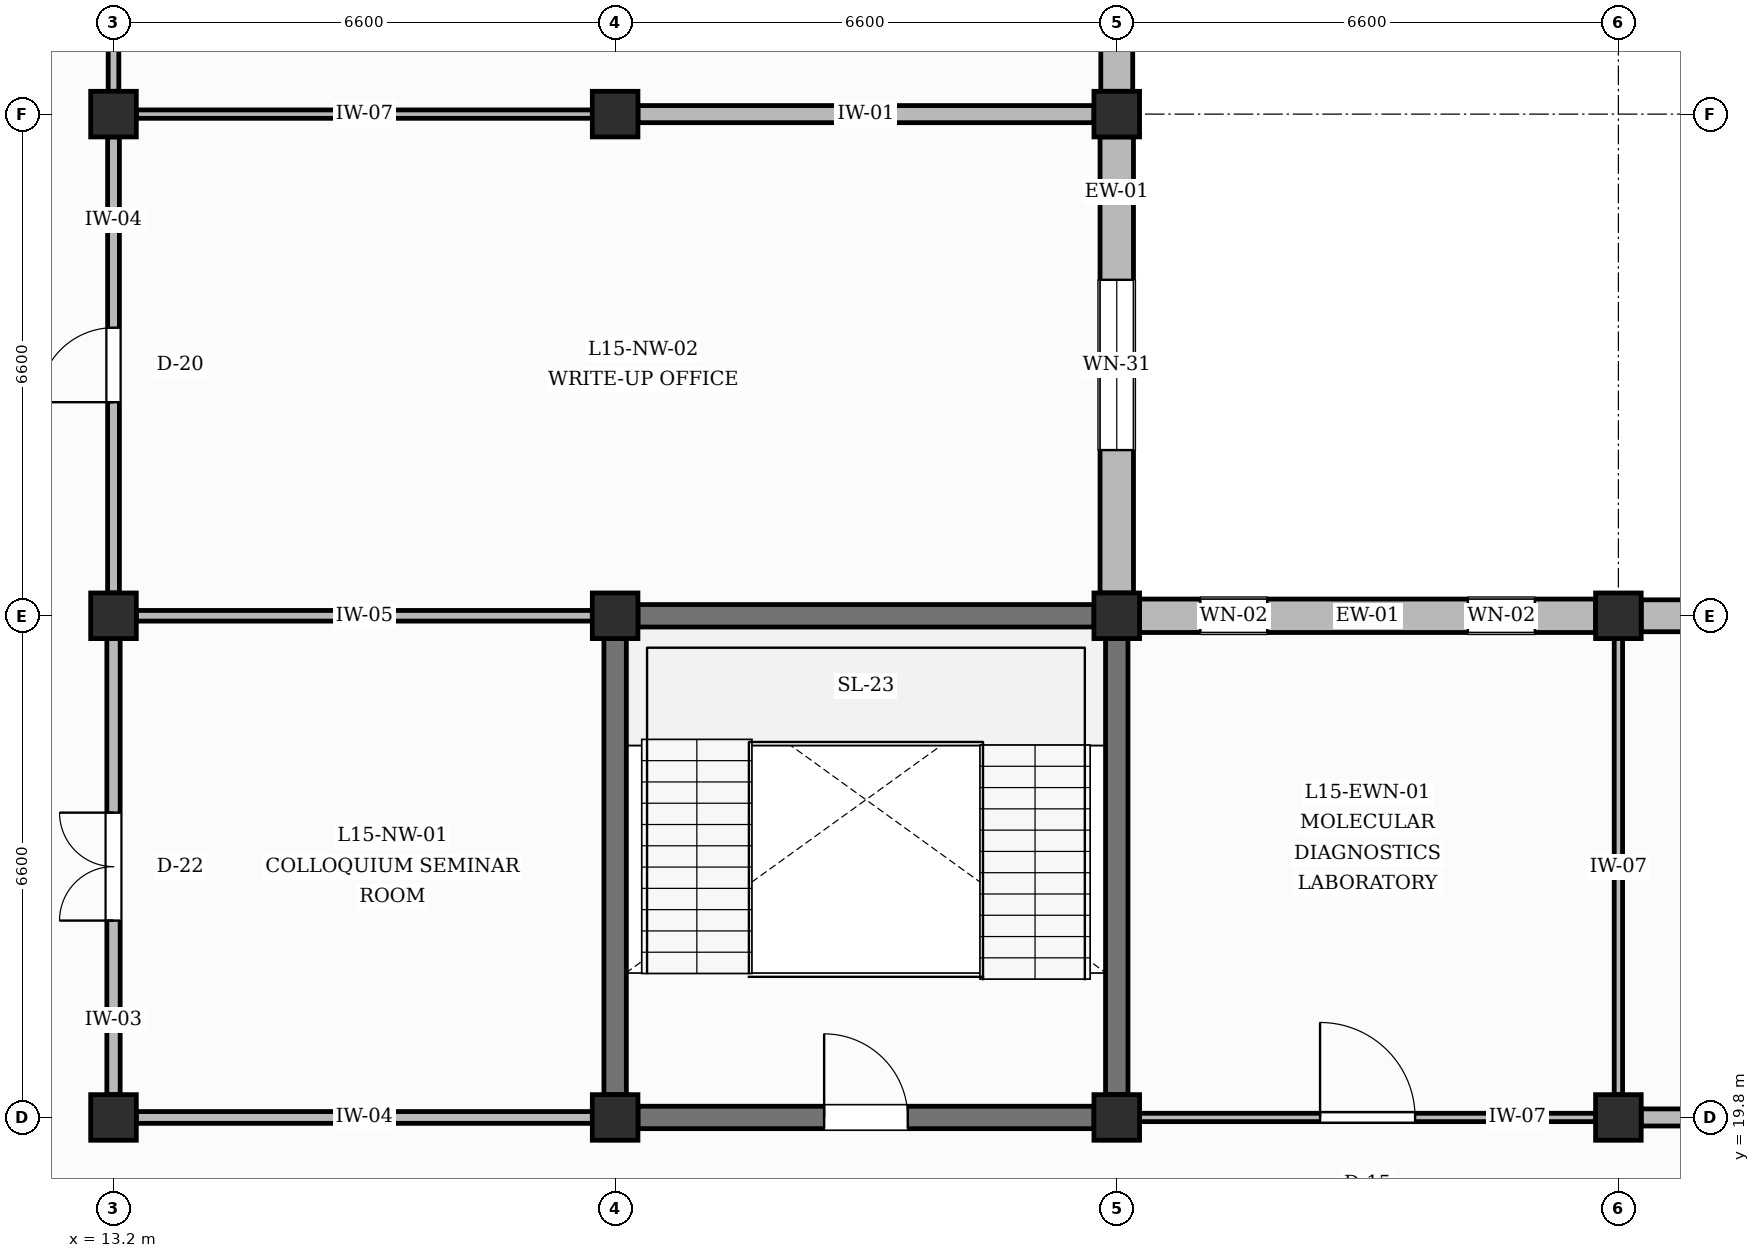
"""IFC4 building model, lengths in metres.
Left out: names, types, materials, properties, quantities, classifications, styles, units other than length and angle.
Written with IfcOpenShell. Run it as: python <this file> out.ifc"""

import sys

from ifc_helpers import new_model, si_unit, direction, frame, frame_2d, origin, origin_2d, place, context, subcontext, project, spatial, rectangle, extrude, element, fill, save


model = new_model("IFC4")
c1 = context("Model", 3, precision=1e-05, world=origin(), true_north=direction((0.0, 1.0)))
c2 = subcontext(c1, "Body", "Model", "MODEL_VIEW")
j1 = project(units=[si_unit("LENGTHUNIT", "METRE"), si_unit("PLANEANGLEUNIT", "RADIAN")], contexts=[c1])
p1 = place(None, origin())
s1 = spatial("IfcSite", under=j1, at=p1, CompositionType="ELEMENT")
p2 = place(p1, origin())
s2 = spatial("IfcBuilding", under=s1, at=p2, CompositionType="ELEMENT")
p3 = place(p2, frame((0.0, 0.0, 64.8)))
s3 = spatial("IfcBuildingStorey", under=s2, at=p3, CompositionType="ELEMENT", Elevation=64.8)
for number, where, z_axis, x_axis in (
    (1, (13.2, 19.8, 0.0), (0.0, 0.0, 1.0), (1.0, 0.0, 0.0)),
    (2, (13.2, 26.4, 0.0), (0.0, 0.0, 1.0), (1.0, 0.0, 0.0)),
    (3, (13.2, 33.0, 0.0), (0.0, 0.0, 1.0), (1.0, 0.0, 0.0)),
    (4, (19.8, 19.8, 0.0), (0.0, 0.0, 1.0), (1.0, 0.0, 0.0)),
    (5, (19.8, 26.4, 0.0), (0.0, 0.0, 1.0), (1.0, 0.0, 0.0)),
    (6, (19.8, 33.0, 0.0), (0.0, 0.0, 1.0), (1.0, 0.0, 0.0)),
    (7, (26.4, 19.8, 0.0), (0.0, 0.0, 1.0), (1.0, 0.0, 0.0)),
    (8, (26.4, 26.4, 0.0), (0.0, 0.0, 1.0), (1.0, 0.0, 0.0)),
    (9, (26.4, 33.0, 0.0), (0.0, 0.0, 1.0), (1.0, 0.0, 0.0)),
    (10, (33.0, 19.8, 0.0), (0.0, 0.0, 1.0), (1.0, 0.0, 0.0)),
    (11, (33.0, 26.4, 0.0), (0.0, 0.0, 1.0), (1.0, 0.0, 0.0)),
):
    element("IfcColumn", number, at=place(p3, frame(where, z_axis=z_axis, x_axis=x_axis)), inside=s3, PredefinedType="COLUMN", context=c2, shape_type="SweptSolid", body=[
        extrude(rectangle(XDim=0.6, YDim=0.6, at=origin_2d()), origin(), (0.0, 0.0, 1.0), 4.2),
    ])
p4 = place(p3, frame((26.4, 26.7, 0.0), z_axis=(0.0, 0.0, 1.0), x_axis=(0.0, 1.0, 0.0)))
e12 = element("IfcWall", 12, at=p4, inside=s3, PredefinedType="SOLIDWALL", context=c2, shape_type="SweptSolid", body=[
    extrude(rectangle(XDim=6.0, YDim=0.44, at=frame_2d((3.0, 0.0))), origin(), (0.0, 0.0, 1.0), 3.3),
])
p5 = place(p4, frame((1.88, 0.0, 0.95)))
e13 = element("IfcOpeningElement", 13, at=p5, cuts=e12, PredefinedType="OPENING", context=c2, shape_type="SweptSolid", body=[
    extrude(rectangle(XDim=2.24, YDim=1.74, at=frame_2d((1.12, 0.87))), frame((0.0, 0.23, 0.0), z_axis=(0.0, -1.0, 0.0), x_axis=(1.0, 0.0, 0.0)), (0.0, 0.0, 1.0), 0.46),
])
p6 = place(p3, frame((26.4, 33.3, 0.0), z_axis=(0.0, 0.0, 1.0), x_axis=(0.0, 1.0, 0.0)))
e14 = element("IfcWall", 14, at=p6, inside=s3, PredefinedType="SOLIDWALL", context=c2, shape_type="SweptSolid", body=[
    extrude(rectangle(XDim=6.0, YDim=0.42, at=frame_2d((3.0, 0.0))), origin(), (0.0, 0.0, 1.0), 3.3),
])
p7 = place(p6, frame((1.88, 0.0, 0.95)))
e15 = element("IfcOpeningElement", 15, at=p7, cuts=e14, PredefinedType="OPENING", context=c2, shape_type="SweptSolid", body=[
    extrude(rectangle(XDim=2.24, YDim=1.96, at=frame_2d((1.12, 0.98))), frame((0.0, 0.22, 0.0), z_axis=(0.0, -1.0, 0.0), x_axis=(1.0, 0.0, 0.0)), (0.0, 0.0, 1.0), 0.44),
])
p8 = place(p3, frame((26.7, 26.4, 0.0), z_axis=(0.0, 0.0, 1.0), x_axis=(1.0, 0.0, 0.0)))
e16 = element("IfcWall", 16, at=p8, inside=s3, PredefinedType="SOLIDWALL", context=c2, shape_type="SweptSolid", body=[
    extrude(rectangle(XDim=6.0, YDim=0.44, at=frame_2d((3.0, 0.0))), origin(), (0.0, 0.0, 1.0), 3.3),
])
p9 = place(p8, frame((0.8, 0.0, 0.95)))
e17 = element("IfcOpeningElement", 17, at=p9, cuts=e16, PredefinedType="OPENING", context=c2, shape_type="SweptSolid", body=[
    extrude(rectangle(XDim=0.88, YDim=1.52, at=frame_2d((0.44, 0.76))), frame((0.0, 0.23, 0.0), z_axis=(0.0, -1.0, 0.0), x_axis=(1.0, 0.0, 0.0)), (0.0, 0.0, 1.0), 0.46),
])
p10 = place(p8, frame((4.32, 0.0, 0.95)))
e18 = element("IfcOpeningElement", 18, at=p10, cuts=e16, PredefinedType="OPENING", context=c2, shape_type="SweptSolid", body=[
    extrude(rectangle(XDim=0.88, YDim=1.52, at=frame_2d((0.44, 0.76))), frame((0.0, 0.23, 0.0), z_axis=(0.0, -1.0, 0.0), x_axis=(1.0, 0.0, 0.0)), (0.0, 0.0, 1.0), 0.46),
])
p11 = place(p3, frame((33.3, 26.4, 0.0), z_axis=(0.0, 0.0, 1.0), x_axis=(1.0, 0.0, 0.0)))
e19 = element("IfcWall", 19, at=p11, inside=s3, PredefinedType="SOLIDWALL", context=c2, shape_type="SweptSolid", body=[
    extrude(rectangle(XDim=6.0, YDim=0.42, at=frame_2d((3.0, 0.0))), origin(), (0.0, 0.0, 1.0), 3.3),
])
p12 = place(p11, frame((0.8, 0.0, 0.95)))
e20 = element("IfcOpeningElement", 20, at=p12, cuts=e19, PredefinedType="OPENING", context=c2, shape_type="SweptSolid", body=[
    extrude(rectangle(XDim=1.02, YDim=1.3, at=frame_2d((0.51, 0.65))), frame((0.0, 0.22, 0.0), z_axis=(0.0, -1.0, 0.0), x_axis=(1.0, 0.0, 0.0)), (0.0, 0.0, 1.0), 0.44),
])
p13 = place(p11, frame((4.18, 0.0, 0.95)))
e21 = element("IfcOpeningElement", 21, at=p13, cuts=e19, PredefinedType="OPENING", context=c2, shape_type="SweptSolid", body=[
    extrude(rectangle(XDim=1.02, YDim=1.3, at=frame_2d((0.51, 0.65))), frame((0.0, 0.22, 0.0), z_axis=(0.0, -1.0, 0.0), x_axis=(1.0, 0.0, 0.0)), (0.0, 0.0, 1.0), 0.44),
])
p14 = place(p3, frame((20.1, 19.8, 0.0), z_axis=(0.0, 0.0, 1.0), x_axis=(1.0, 0.0, 0.0)))
e22 = element("IfcWall", 22, at=p14, inside=s3, PredefinedType="SHEAR", context=c2, shape_type="SweptSolid", body=[
    extrude(rectangle(XDim=6.0, YDim=0.295, at=frame_2d((3.0, 0.0))), origin(), (0.0, 0.0, 1.0), 3.3),
])
p15 = place(p14, frame((2.45, 0.0, 0.0)))
e23 = element("IfcOpeningElement", 23, at=p15, cuts=e22, PredefinedType="OPENING", context=c2, shape_type="SweptSolid", body=[
    extrude(rectangle(XDim=1.1, YDim=2.15, at=frame_2d((0.55, 1.075))), frame((0.0, 0.157, 0.0), z_axis=(0.0, -1.0, 0.0), x_axis=(1.0, 0.0, 0.0)), (0.0, 0.0, 1.0), 0.315),
])
for number, where, z_axis, x_axis in (
    (24, (20.1, 26.4, 0.0), (0.0, 0.0, 1.0), (1.0, 0.0, 0.0)),
    (25, (19.8, 20.1, 0.0), (0.0, 0.0, 1.0), (0.0, 1.0, 0.0)),
    (26, (26.4, 20.1, 0.0), (0.0, 0.0, 1.0), (0.0, 1.0, 0.0)),
):
    element("IfcWall", number, at=place(p3, frame(where, z_axis=z_axis, x_axis=x_axis)), inside=s3, PredefinedType="SHEAR", context=c2, shape_type="SweptSolid", body=[
        extrude(rectangle(XDim=6.0, YDim=0.295, at=frame_2d((3.0, 0.0))), origin(), (0.0, 0.0, 1.0), 3.3),
    ])
p16 = place(p3, frame((13.2, 20.1, 0.0), z_axis=(0.0, 0.0, 1.0), x_axis=(0.0, 1.0, 0.0)))
e27 = element("IfcWall", 27, at=p16, inside=s3, PredefinedType="PARTITIONING", context=c2, shape_type="SweptSolid", body=[
    extrude(rectangle(XDim=6.0, YDim=0.175, at=frame_2d((3.0, 0.0))), origin(), (0.0, 0.0, 1.0), 3.3),
])
p17 = place(p16, frame((2.29, 0.0, 0.0)))
e28 = element("IfcOpeningElement", 28, at=p17, cuts=e27, PredefinedType="OPENING", context=c2, shape_type="SweptSolid", body=[
    extrude(rectangle(XDim=1.42, YDim=2.2, at=frame_2d((0.71, 1.1))), frame((0.0, 0.097, 0.0), z_axis=(0.0, -1.0, 0.0), x_axis=(1.0, 0.0, 0.0)), (0.0, 0.0, 1.0), 0.195),
])
p18 = place(p3, frame((13.2, 26.7, 0.0), z_axis=(0.0, 0.0, 1.0), x_axis=(0.0, 1.0, 0.0)))
e29 = element("IfcWall", 29, at=p18, inside=s3, PredefinedType="PARTITIONING", context=c2, shape_type="SweptSolid", body=[
    extrude(rectangle(XDim=6.0, YDim=0.155, at=frame_2d((3.0, 0.0))), origin(), (0.0, 0.0, 1.0), 3.3),
])
p19 = place(p18, frame((2.51, 0.0, 0.0)))
e30 = element("IfcOpeningElement", 30, at=p19, cuts=e29, PredefinedType="OPENING", context=c2, shape_type="SweptSolid", body=[
    extrude(rectangle(XDim=0.98, YDim=2.15, at=frame_2d((0.49, 1.075))), frame((0.0, 0.087, 0.0), z_axis=(0.0, -1.0, 0.0), x_axis=(1.0, 0.0, 0.0)), (0.0, 0.0, 1.0), 0.175),
])
p20 = place(p3, frame((13.2, 33.3, 0.0), z_axis=(0.0, 0.0, 1.0), x_axis=(0.0, 1.0, 0.0)))
e31 = element("IfcWall", 31, at=p20, inside=s3, PredefinedType="PARTITIONING", context=c2, shape_type="SweptSolid", body=[
    extrude(rectangle(XDim=6.0, YDim=0.14, at=frame_2d((3.0, 0.0))), origin(), (0.0, 0.0, 1.0), 3.3),
])
p21 = place(p20, frame((2.275, 0.0, 0.0)))
e32 = element("IfcOpeningElement", 32, at=p21, cuts=e31, PredefinedType="OPENING", context=c2, shape_type="SweptSolid", body=[
    extrude(rectangle(XDim=1.45, YDim=2.25, at=frame_2d((0.725, 1.125))), frame((0.0, 0.08, 0.0), z_axis=(0.0, -1.0, 0.0), x_axis=(1.0, 0.0, 0.0)), (0.0, 0.0, 1.0), 0.16),
])
p22 = place(p3, frame((13.5, 19.8, 0.0), z_axis=(0.0, 0.0, 1.0), x_axis=(1.0, 0.0, 0.0)))
e33 = element("IfcWall", 33, at=p22, inside=s3, PredefinedType="PARTITIONING", context=c2, shape_type="SweptSolid", body=[
    extrude(rectangle(XDim=6.0, YDim=0.155, at=frame_2d((3.0, 0.0))), origin(), (0.0, 0.0, 1.0), 3.3),
])
p23 = place(p3, frame((13.5, 26.4, 0.0), z_axis=(0.0, 0.0, 1.0), x_axis=(1.0, 0.0, 0.0)))
e34 = element("IfcWall", 34, at=p23, inside=s3, PredefinedType="PARTITIONING", context=c2, shape_type="SweptSolid", body=[
    extrude(rectangle(XDim=6.0, YDim=0.14, at=frame_2d((3.0, 0.0))), origin(), (0.0, 0.0, 1.0), 3.3),
])
p24 = place(p3, frame((13.5, 33.0, 0.0), z_axis=(0.0, 0.0, 1.0), x_axis=(1.0, 0.0, 0.0)))
e35 = element("IfcWall", 35, at=p24, inside=s3, PredefinedType="PARTITIONING", context=c2, shape_type="SweptSolid", body=[
    extrude(rectangle(XDim=6.0, YDim=0.11, at=frame_2d((3.0, 0.0))), origin(), (0.0, 0.0, 1.0), 3.3),
])
p25 = place(p3, frame((20.1, 33.0, 0.0), z_axis=(0.0, 0.0, 1.0), x_axis=(1.0, 0.0, 0.0)))
e36 = element("IfcWall", 36, at=p25, inside=s3, PredefinedType="PARTITIONING", context=c2, shape_type="SweptSolid", body=[
    extrude(rectangle(XDim=6.0, YDim=0.225, at=frame_2d((3.0, 0.0))), origin(), (0.0, 0.0, 1.0), 3.3),
])
p26 = place(p3, frame((26.7, 19.8, 0.0), z_axis=(0.0, 0.0, 1.0), x_axis=(1.0, 0.0, 0.0)))
e37 = element("IfcWall", 37, at=p26, inside=s3, PredefinedType="PARTITIONING", context=c2, shape_type="SweptSolid", body=[
    extrude(rectangle(XDim=6.0, YDim=0.11, at=frame_2d((3.0, 0.0))), origin(), (0.0, 0.0, 1.0), 3.3),
])
p27 = place(p26, frame((2.375, 0.0, 0.0)))
e38 = element("IfcOpeningElement", 38, at=p27, cuts=e37, PredefinedType="OPENING", context=c2, shape_type="SweptSolid", body=[
    extrude(rectangle(XDim=1.25, YDim=2.25, at=frame_2d((0.625, 1.125))), frame((0.0, 0.065, 0.0), z_axis=(0.0, -1.0, 0.0), x_axis=(1.0, 0.0, 0.0)), (0.0, 0.0, 1.0), 0.13),
])
p28 = place(p3, frame((33.0, 20.1, 0.0), z_axis=(0.0, 0.0, 1.0), x_axis=(0.0, 1.0, 0.0)))
e39 = element("IfcWall", 39, at=p28, inside=s3, PredefinedType="PARTITIONING", context=c2, shape_type="SweptSolid", body=[
    extrude(rectangle(XDim=6.0, YDim=0.11, at=frame_2d((3.0, 0.0))), origin(), (0.0, 0.0, 1.0), 3.3),
])
p29 = place(p3, frame((33.3, 19.8, 0.0), z_axis=(0.0, 0.0, 1.0), x_axis=(1.0, 0.0, 0.0)))
e40 = element("IfcWall", 40, at=p29, inside=s3, PredefinedType="PARTITIONING", context=c2, shape_type="SweptSolid", body=[
    extrude(rectangle(XDim=6.0, YDim=0.225, at=frame_2d((3.0, 0.0))), origin(), (0.0, 0.0, 1.0), 3.3),
])
p30 = place(p29, frame((2.475, 0.0, 0.0)))
e41 = element("IfcOpeningElement", 41, at=p30, cuts=e40, PredefinedType="OPENING", context=c2, shape_type="SweptSolid", body=[
    extrude(rectangle(XDim=1.05, YDim=2.15, at=frame_2d((0.525, 1.075))), frame((0.0, 0.123, 0.0), z_axis=(0.0, -1.0, 0.0), x_axis=(1.0, 0.0, 0.0)), (0.0, 0.0, 1.0), 0.245),
])
p31 = place(p5, origin())
e42 = element("IfcWindow", 42, at=p31, inside=s3, PartitioningType="DOUBLE_PANEL_VERTICAL", PredefinedType="WINDOW", context=c2, shape_type="SweptSolid", body=[
    extrude(rectangle(XDim=2.24, YDim=1.74, at=frame_2d((1.12, 0.87))), frame((0.0, 0.03, 0.0), z_axis=(0.0, -1.0, 0.0), x_axis=(1.0, 0.0, 0.0)), (0.0, 0.0, 1.0), 0.06),
])
fill(e13, e42)
p32 = place(p9, origin())
e43 = element("IfcWindow", 43, at=p32, inside=s3, PartitioningType="SINGLE_PANEL", PredefinedType="WINDOW", context=c2, shape_type="SweptSolid", body=[
    extrude(rectangle(XDim=0.88, YDim=1.52, at=frame_2d((0.44, 0.76))), frame((0.0, 0.03, 0.0), z_axis=(0.0, -1.0, 0.0), x_axis=(1.0, 0.0, 0.0)), (0.0, 0.0, 1.0), 0.06),
])
fill(e17, e43)
p33 = place(p10, origin())
e44 = element("IfcWindow", 44, at=p33, inside=s3, PartitioningType="SINGLE_PANEL", PredefinedType="WINDOW", context=c2, shape_type="SweptSolid", body=[
    extrude(rectangle(XDim=0.88, YDim=1.52, at=frame_2d((0.44, 0.76))), frame((0.0, 0.03, 0.0), z_axis=(0.0, -1.0, 0.0), x_axis=(1.0, 0.0, 0.0)), (0.0, 0.0, 1.0), 0.06),
])
fill(e18, e44)
p34 = place(p15, origin())
e45 = element("IfcDoor", 45, at=p34, inside=s3, OperationType="SINGLE_SWING_LEFT", PredefinedType="DOOR", context=c2, shape_type="SweptSolid", body=[
    extrude(rectangle(XDim=1.1, YDim=2.15, at=frame_2d((0.55, 1.075))), frame((0.0, 0.025, 0.0), z_axis=(0.0, -1.0, 0.0), x_axis=(1.0, 0.0, 0.0)), (0.0, 0.0, 1.0), 0.05),
])
fill(e23, e45)
p35 = place(p17, origin())
e46 = element("IfcDoor", 46, at=p35, inside=s3, OperationType="DOUBLE_DOOR_SINGLE_SWING", PredefinedType="DOOR", context=c2, shape_type="SweptSolid", body=[
    extrude(rectangle(XDim=1.42, YDim=2.2, at=frame_2d((0.71, 1.1))), frame((0.0, 0.025, 0.0), z_axis=(0.0, -1.0, 0.0), x_axis=(1.0, 0.0, 0.0)), (0.0, 0.0, 1.0), 0.05),
])
fill(e28, e46)
p36 = place(p19, origin())
e47 = element("IfcDoor", 47, at=p36, inside=s3, OperationType="SINGLE_SWING_LEFT", PredefinedType="DOOR", context=c2, shape_type="SweptSolid", body=[
    extrude(rectangle(XDim=0.98, YDim=2.15, at=frame_2d((0.49, 1.075))), frame((0.0, 0.025, 0.0), z_axis=(0.0, -1.0, 0.0), x_axis=(1.0, 0.0, 0.0)), (0.0, 0.0, 1.0), 0.05),
])
fill(e30, e47)
p37 = place(p27, origin())
e48 = element("IfcDoor", 48, at=p37, inside=s3, OperationType="SINGLE_SWING_LEFT", PredefinedType="DOOR", context=c2, shape_type="SweptSolid", body=[
    extrude(rectangle(XDim=1.25, YDim=2.25, at=frame_2d((0.625, 1.125))), frame((0.0, 0.025, 0.0), z_axis=(0.0, -1.0, 0.0), x_axis=(1.0, 0.0, 0.0)), (0.0, 0.0, 1.0), 0.05),
])
fill(e38, e48)
save(model, sys.argv[1])
